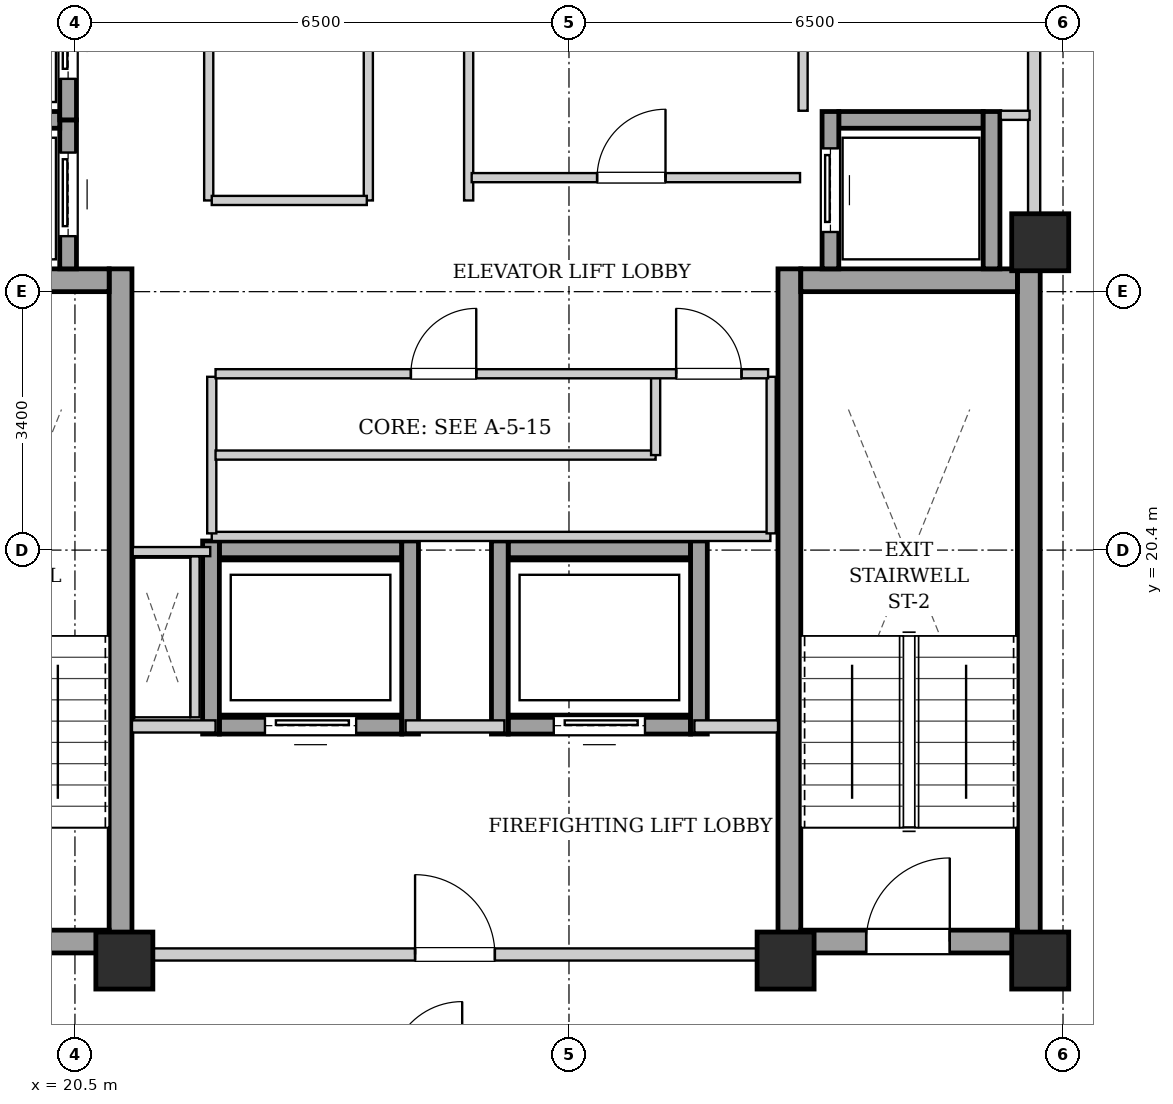
"""IFC4 building model, lengths in metres.
Left out: names, types, materials, properties, quantities, classifications, styles, units other than length and angle.
Written with IfcOpenShell. Run it as: python <this file> out.ifc"""

import sys

from ifc_helpers import new_model, si_unit, direction, frame, frame_2d, origin, origin_2d, place, context, subcontext, project, spatial, rectangle, extrude, element, fill, save


model = new_model("IFC4")
c1 = context("Model", 3, precision=1e-05, world=origin(), true_north=direction((0.0, 1.0)))
c2 = subcontext(c1, "Body", "Model", "MODEL_VIEW")
j1 = project(units=[si_unit("LENGTHUNIT", "METRE"), si_unit("PLANEANGLEUNIT", "RADIAN")], contexts=[c1])
p1 = place(None, origin())
s1 = spatial("IfcSite", under=j1, at=p1, CompositionType="ELEMENT")
p2 = place(p1, origin())
s2 = spatial("IfcBuilding", under=s1, at=p2, CompositionType="ELEMENT")
p3 = place(p2, frame((0.0, 0.0, 258.1)))
s3 = spatial("IfcBuildingStorey", under=s2, at=p3, CompositionType="ELEMENT", Elevation=258.1)
for number, where, z_axis, x_axis in (
    (1, (21.15, 15.0, 0.0), (0.0, 0.0, 1.0), (1.0, 0.0, 0.0)),
    (2, (29.85, 15.0, 0.0), (0.0, 0.0, 1.0), (1.0, 0.0, 0.0)),
    (3, (33.2, 15.0, 0.0), (0.0, 0.0, 1.0), (1.0, 0.0, 0.0)),
    (4, (33.2, 24.45, 0.0), (0.0, 0.0, 1.0), (1.0, 0.0, 0.0)),
):
    element("IfcColumn", number, at=place(p3, frame(where, z_axis=z_axis, x_axis=x_axis)), inside=s3, PredefinedType="COLUMN", context=c2, shape_type="SweptSolid", body=[
        extrude(rectangle(XDim=0.75, YDim=0.75, at=origin_2d()), origin(), (0.0, 0.0, 1.0), 3.4),
    ])
p4 = place(p3, frame((21.1, 15.1, 0.0), z_axis=(0.0, 0.0, 1.0), x_axis=(0.0, 1.0, 0.0)))
e5 = element("IfcWall", 5, at=p4, inside=s3, PredefinedType="SHEAR", context=c2, shape_type="SweptSolid", body=[
    extrude(rectangle(XDim=9.0, YDim=0.3, at=frame_2d((4.5, 0.0))), origin(), (0.0, 0.0, 1.0), 3.05),
])
p5 = place(p3, frame((18.1, 23.95, 0.0), z_axis=(0.0, 0.0, 1.0), x_axis=(1.0, 0.0, 0.0)))
e6 = element("IfcWall", 6, at=p5, inside=s3, PredefinedType="SHEAR", context=c2, shape_type="SweptSolid", body=[
    extrude(rectangle(XDim=2.85, YDim=0.3, at=frame_2d((1.425, 0.0))), origin(), (0.0, 0.0, 1.0), 3.05),
])
p6 = place(p3, frame((18.1, 15.25, 0.0), z_axis=(0.0, 0.0, 1.0), x_axis=(1.0, 0.0, 0.0)))
e7 = element("IfcWall", 7, at=p6, inside=s3, PredefinedType="SHEAR", context=c2, shape_type="SweptSolid", body=[
    extrude(rectangle(XDim=2.85, YDim=0.3, at=frame_2d((1.425, 0.0))), origin(), (0.0, 0.0, 1.0), 3.05),
])
p7 = place(p6, frame((0.86, 0.0, 0.0)))
e8 = element("IfcOpeningElement", 8, at=p7, cuts=e7, PredefinedType="OPENING", context=c2, shape_type="SweptSolid", body=[
    extrude(rectangle(XDim=1.1, YDim=2.05, at=frame_2d((0.55, 1.025))), frame((0.0, 0.16, 0.0), z_axis=(0.0, -1.0, 0.0), x_axis=(1.0, 0.0, 0.0)), (0.0, 0.0, 1.0), 0.32),
])
for number, where, z_axis, x_axis in (
    (9, (29.9, 15.1, 0.0), (0.0, 0.0, 1.0), (0.0, 1.0, 0.0)),
    (10, (33.05, 15.1, 0.0), (0.0, 0.0, 1.0), (0.0, 1.0, 0.0)),
):
    element("IfcWall", number, at=place(p3, frame(where, z_axis=z_axis, x_axis=x_axis)), inside=s3, PredefinedType="SHEAR", context=c2, shape_type="SweptSolid", body=[
        extrude(rectangle(XDim=9.0, YDim=0.3, at=frame_2d((4.5, 0.0))), origin(), (0.0, 0.0, 1.0), 3.05),
    ])
p8 = place(p3, frame((30.05, 23.95, 0.0), z_axis=(0.0, 0.0, 1.0), x_axis=(1.0, 0.0, 0.0)))
e11 = element("IfcWall", 11, at=p8, inside=s3, PredefinedType="SHEAR", context=c2, shape_type="SweptSolid", body=[
    extrude(rectangle(XDim=2.85, YDim=0.3, at=frame_2d((1.425, 0.0))), origin(), (0.0, 0.0, 1.0), 3.05),
])
p9 = place(p3, frame((30.05, 15.25, 0.0), z_axis=(0.0, 0.0, 1.0), x_axis=(1.0, 0.0, 0.0)))
e12 = element("IfcWall", 12, at=p9, inside=s3, PredefinedType="SHEAR", context=c2, shape_type="SweptSolid", body=[
    extrude(rectangle(XDim=2.85, YDim=0.3, at=frame_2d((1.425, 0.0))), origin(), (0.0, 0.0, 1.0), 3.05),
])
p10 = place(p9, frame((0.86, 0.0, 0.0)))
e13 = element("IfcOpeningElement", 13, at=p10, cuts=e12, PredefinedType="OPENING", context=c2, shape_type="SweptSolid", body=[
    extrude(rectangle(XDim=1.1, YDim=2.05, at=frame_2d((0.55, 1.025))), frame((0.0, 0.16, 0.0), z_axis=(0.0, -1.0, 0.0), x_axis=(1.0, 0.0, 0.0)), (0.0, 0.0, 1.0), 0.32),
])
p11 = place(p3, frame((20.41, 24.1, 0.0), z_axis=(0.0, 0.0, 1.0), x_axis=(0.0, 1.0, 0.0)))
e14 = element("IfcWall", 14, at=p11, inside=s3, PredefinedType="SHEAR", context=c2, shape_type="SweptSolid", body=[
    extrude(rectangle(XDim=1.96, YDim=0.22, at=frame_2d((0.98, 0.0))), origin(), (0.0, 0.0, 1.0), 3.05),
])
p12 = place(p11, frame((0.43, 0.0, 0.0)))
e15 = element("IfcOpeningElement", 15, at=p12, cuts=e14, PredefinedType="OPENING", context=c2, shape_type="SweptSolid", body=[
    extrude(rectangle(XDim=1.1, YDim=2.15, at=frame_2d((0.55, 1.075))), frame((0.0, 0.12, 0.0), z_axis=(0.0, -1.0, 0.0), x_axis=(1.0, 0.0, 0.0)), (0.0, 0.0, 1.0), 0.24),
])
p13 = place(p3, frame((18.4, 26.06, 0.0), z_axis=(0.0, 0.0, 1.0), x_axis=(1.0, 0.0, 0.0)))
e16 = element("IfcWall", 16, at=p13, inside=s3, PredefinedType="SHEAR", context=c2, shape_type="SweptSolid", body=[
    extrude(rectangle(XDim=1.9, YDim=0.22, at=frame_2d((0.95, 0.0))), origin(), (0.0, 0.0, 1.0), 3.05),
])
p14 = place(p3, frame((20.41, 26.06, 0.0), z_axis=(0.0, 0.0, 1.0), x_axis=(0.0, 1.0, 0.0)))
e17 = element("IfcWall", 17, at=p14, inside=s3, PredefinedType="SHEAR", context=c2, shape_type="SweptSolid", body=[
    extrude(rectangle(XDim=2.18, YDim=0.22, at=frame_2d((1.09, 0.0))), origin(), (0.0, 0.0, 1.0), 3.05),
])
p15 = place(p14, frame((0.54, 0.0, 0.0)))
e18 = element("IfcOpeningElement", 18, at=p15, cuts=e17, PredefinedType="OPENING", context=c2, shape_type="SweptSolid", body=[
    extrude(rectangle(XDim=1.1, YDim=2.15, at=frame_2d((0.55, 1.075))), frame((0.0, 0.12, 0.0), z_axis=(0.0, -1.0, 0.0), x_axis=(1.0, 0.0, 0.0)), (0.0, 0.0, 1.0), 0.24),
])
p16 = place(p3, frame((30.55, 26.06, 0.0), z_axis=(0.0, 0.0, 1.0), x_axis=(1.0, 0.0, 0.0)))
e19 = element("IfcWall", 19, at=p16, inside=s3, PredefinedType="SHEAR", context=c2, shape_type="SweptSolid", body=[
    extrude(rectangle(XDim=1.9, YDim=0.22, at=frame_2d((0.95, 0.0))), origin(), (0.0, 0.0, 1.0), 3.05),
])
p17 = place(p3, frame((30.44, 24.1, 0.0), z_axis=(0.0, 0.0, 1.0), x_axis=(0.0, 1.0, 0.0)))
e20 = element("IfcWall", 20, at=p17, inside=s3, PredefinedType="SHEAR", context=c2, shape_type="SweptSolid", body=[
    extrude(rectangle(XDim=2.07, YDim=0.22, at=frame_2d((1.035, 0.0))), origin(), (0.0, 0.0, 1.0), 3.05),
])
p18 = place(p17, frame((0.485, 0.0, 0.0)))
e21 = element("IfcOpeningElement", 21, at=p18, cuts=e20, PredefinedType="OPENING", context=c2, shape_type="SweptSolid", body=[
    extrude(rectangle(XDim=1.1, YDim=2.15, at=frame_2d((0.55, 1.075))), frame((0.0, 0.12, 0.0), z_axis=(0.0, -1.0, 0.0), x_axis=(1.0, 0.0, 0.0)), (0.0, 0.0, 1.0), 0.24),
])
p19 = place(p3, frame((32.56, 24.1, 0.0), z_axis=(0.0, 0.0, 1.0), x_axis=(0.0, 1.0, 0.0)))
e22 = element("IfcWall", 22, at=p19, inside=s3, PredefinedType="SHEAR", context=c2, shape_type="SweptSolid", body=[
    extrude(rectangle(XDim=2.07, YDim=0.22, at=frame_2d((1.035, 0.0))), origin(), (0.0, 0.0, 1.0), 3.05),
])
p20 = place(p3, frame((22.4, 18.09, 0.0), z_axis=(0.0, 0.0, 1.0), x_axis=(1.0, 0.0, 0.0)))
e23 = element("IfcWall", 23, at=p20, inside=s3, PredefinedType="SHEAR", context=c2, shape_type="SweptSolid", body=[
    extrude(rectangle(XDim=2.4, YDim=0.22, at=frame_2d((1.2, 0.0))), origin(), (0.0, 0.0, 1.0), 3.05),
])
p21 = place(p20, frame((0.6, 0.0, 0.0)))
e24 = element("IfcOpeningElement", 24, at=p21, cuts=e23, PredefinedType="OPENING", context=c2, shape_type="SweptSolid", body=[
    extrude(rectangle(XDim=1.2, YDim=2.15, at=frame_2d((0.6, 1.075))), frame((0.0, 0.12, 0.0), z_axis=(0.0, -1.0, 0.0), x_axis=(1.0, 0.0, 0.0)), (0.0, 0.0, 1.0), 0.24),
])
p22 = place(p3, frame((22.4, 20.41, 0.0), z_axis=(0.0, 0.0, 1.0), x_axis=(1.0, 0.0, 0.0)))
e25 = element("IfcWall", 25, at=p22, inside=s3, PredefinedType="SHEAR", context=c2, shape_type="SweptSolid", body=[
    extrude(rectangle(XDim=2.4, YDim=0.22, at=frame_2d((1.2, 0.0))), origin(), (0.0, 0.0, 1.0), 3.05),
])
for number, where, z_axis, x_axis in (
    (26, (22.29, 17.98, 0.0), (0.0, 0.0, 1.0), (0.0, 1.0, 0.0)),
    (27, (24.91, 17.98, 0.0), (0.0, 0.0, 1.0), (0.0, 1.0, 0.0)),
):
    element("IfcWall", number, at=place(p3, frame(where, z_axis=z_axis, x_axis=x_axis)), inside=s3, PredefinedType="SHEAR", context=c2, shape_type="SweptSolid", body=[
        extrude(rectangle(XDim=2.54, YDim=0.22, at=frame_2d((1.27, 0.0))), origin(), (0.0, 0.0, 1.0), 3.05),
    ])
p23 = place(p3, frame((26.2, 18.09, 0.0), z_axis=(0.0, 0.0, 1.0), x_axis=(1.0, 0.0, 0.0)))
e28 = element("IfcWall", 28, at=p23, inside=s3, PredefinedType="SHEAR", context=c2, shape_type="SweptSolid", body=[
    extrude(rectangle(XDim=2.4, YDim=0.22, at=frame_2d((1.2, 0.0))), origin(), (0.0, 0.0, 1.0), 3.05),
])
p24 = place(p23, frame((0.6, 0.0, 0.0)))
e29 = element("IfcOpeningElement", 29, at=p24, cuts=e28, PredefinedType="OPENING", context=c2, shape_type="SweptSolid", body=[
    extrude(rectangle(XDim=1.2, YDim=2.15, at=frame_2d((0.6, 1.075))), frame((0.0, 0.12, 0.0), z_axis=(0.0, -1.0, 0.0), x_axis=(1.0, 0.0, 0.0)), (0.0, 0.0, 1.0), 0.24),
])
p25 = place(p3, frame((26.2, 20.41, 0.0), z_axis=(0.0, 0.0, 1.0), x_axis=(1.0, 0.0, 0.0)))
e30 = element("IfcWall", 30, at=p25, inside=s3, PredefinedType="SHEAR", context=c2, shape_type="SweptSolid", body=[
    extrude(rectangle(XDim=2.4, YDim=0.22, at=frame_2d((1.2, 0.0))), origin(), (0.0, 0.0, 1.0), 3.05),
])
for number, where, z_axis, x_axis in (
    (31, (26.09, 17.98, 0.0), (0.0, 0.0, 1.0), (0.0, 1.0, 0.0)),
    (32, (28.71, 17.98, 0.0), (0.0, 0.0, 1.0), (0.0, 1.0, 0.0)),
):
    element("IfcWall", number, at=place(p3, frame(where, z_axis=z_axis, x_axis=x_axis)), inside=s3, PredefinedType="SHEAR", context=c2, shape_type="SweptSolid", body=[
        extrude(rectangle(XDim=2.54, YDim=0.22, at=frame_2d((1.27, 0.0))), origin(), (0.0, 0.0, 1.0), 3.05),
    ])
p26 = place(p3, frame((21.25, 15.08, 0.0), z_axis=(0.0, 0.0, 1.0), x_axis=(1.0, 0.0, 0.0)))
e33 = element("IfcWall", 33, at=p26, inside=s3, PredefinedType="PARTITIONING", context=c2, shape_type="SweptSolid", body=[
    extrude(rectangle(XDim=8.5, YDim=0.16, at=frame_2d((4.25, 0.0))), origin(), (0.0, 0.0, 1.0), 2.578),
])
p27 = place(p26, frame((3.725, 0.0, 0.0)))
e34 = element("IfcOpeningElement", 34, at=p27, cuts=e33, PredefinedType="OPENING", context=c2, shape_type="SweptSolid", body=[
    extrude(rectangle(XDim=1.05, YDim=2.05, at=frame_2d((0.525, 1.025))), frame((0.0, 0.09, 0.0), z_axis=(0.0, -1.0, 0.0), x_axis=(1.0, 0.0, 0.0)), (0.0, 0.0, 1.0), 0.18),
])
p28 = place(p3, frame((21.25, 18.08, 0.0), z_axis=(0.0, 0.0, 1.0), x_axis=(1.0, 0.0, 0.0)))
e35 = element("IfcWall", 35, at=p28, inside=s3, PredefinedType="PARTITIONING", context=c2, shape_type="SweptSolid", body=[
    extrude(rectangle(XDim=1.1, YDim=0.16, at=frame_2d((0.55, 0.0))), origin(), (0.0, 0.0, 1.0), 3.05),
])
p29 = place(p3, frame((24.85, 18.08, 0.0), z_axis=(0.0, 0.0, 1.0), x_axis=(1.0, 0.0, 0.0)))
e36 = element("IfcWall", 36, at=p29, inside=s3, PredefinedType="PARTITIONING", context=c2, shape_type="SweptSolid", body=[
    extrude(rectangle(XDim=1.3, YDim=0.16, at=frame_2d((0.65, 0.0))), origin(), (0.0, 0.0, 1.0), 3.05),
])
p30 = place(p3, frame((28.65, 18.08, 0.0), z_axis=(0.0, 0.0, 1.0), x_axis=(1.0, 0.0, 0.0)))
e37 = element("IfcWall", 37, at=p30, inside=s3, PredefinedType="PARTITIONING", context=c2, shape_type="SweptSolid", body=[
    extrude(rectangle(XDim=1.1, YDim=0.16, at=frame_2d((0.55, 0.0))), origin(), (0.0, 0.0, 1.0), 3.05),
])
p31 = place(p3, frame((33.12, 24.12, 0.0), z_axis=(0.0, 0.0, 1.0), x_axis=(0.0, 1.0, 0.0)))
e38 = element("IfcWall", 38, at=p31, inside=s3, PredefinedType="PARTITIONING", context=c2, shape_type="SweptSolid", body=[
    extrude(rectangle(XDim=4.76, YDim=0.16, at=frame_2d((2.38, 0.0))), origin(), (0.0, 0.0, 1.0), 2.385),
])
p32 = place(p3, frame((22.08, 18.2, 0.0), z_axis=(0.0, 0.0, 1.0), x_axis=(0.0, 1.0, 0.0)))
e39 = element("IfcWall", 39, at=p32, inside=s3, PredefinedType="PARTITIONING", context=c2, shape_type="SweptSolid", body=[
    extrude(rectangle(XDim=2.12, YDim=0.12, at=frame_2d((1.06, 0.0))), origin(), (0.0, 0.0, 1.0), 3.05),
])
p33 = place(p3, frame((22.28, 20.38, 0.0), z_axis=(0.0, 0.0, 1.0), x_axis=(-1.0, 0.0, 0.0)))
e40 = element("IfcWall", 40, at=p33, inside=s3, PredefinedType="PARTITIONING", context=c2, shape_type="SweptSolid", body=[
    extrude(rectangle(XDim=1.02, YDim=0.12, at=frame_2d((0.51, 0.0))), origin(), (0.0, 0.0, 1.0), 3.05),
])
for number, where, z_axis, x_axis in (
    (41, (24.36, 25.0, 0.0), (0.0, 0.0, 1.0), (0.0, 1.0, 0.0)),
    (42, (25.68, 25.0, 0.0), (0.0, 0.0, 1.0), (0.0, 1.0, 0.0)),
):
    element("IfcWall", number, at=place(p3, frame(where, z_axis=z_axis, x_axis=x_axis)), inside=s3, PredefinedType="PARTITIONING", context=c2, shape_type="SweptSolid", body=[
        extrude(rectangle(XDim=3.87, YDim=0.12, at=frame_2d((1.935, 0.0))), origin(), (0.0, 0.0, 1.0), 3.05),
    ])
p34 = place(p3, frame((30.08, 26.18, 0.0), z_axis=(0.0, 0.0, 1.0), x_axis=(0.0, 1.0, 0.0)))
e43 = element("IfcWall", 43, at=p34, inside=s3, PredefinedType="PARTITIONING", context=c2, shape_type="SweptSolid", body=[
    extrude(rectangle(XDim=1.28, YDim=0.12, at=frame_2d((0.64, 0.0))), origin(), (0.0, 0.0, 1.0), 3.05),
])
p35 = place(p3, frame((32.68, 26.12, 0.0), z_axis=(0.0, 0.0, 1.0), x_axis=(1.0, 0.0, 0.0)))
e44 = element("IfcWall", 44, at=p35, inside=s3, PredefinedType="PARTITIONING", context=c2, shape_type="SweptSolid", body=[
    extrude(rectangle(XDim=0.38, YDim=0.12, at=frame_2d((0.19, 0.0))), origin(), (0.0, 0.0, 1.0), 3.05),
])
p36 = place(p3, frame((22.26, 25.0, 0.0), z_axis=(0.0, 0.0, 1.0), x_axis=(0.0, 1.0, 0.0)))
e45 = element("IfcWall", 45, at=p36, inside=s3, PredefinedType="PARTITIONING", context=c2, shape_type="SweptSolid", body=[
    extrude(rectangle(XDim=3.86, YDim=0.12, at=frame_2d((1.93, 0.0))), origin(), (0.0, 0.0, 1.0), 3.05),
])
p37 = place(p3, frame((22.3, 25.0, 0.0), z_axis=(0.0, 0.0, 1.0), x_axis=(1.0, 0.0, 0.0)))
e46 = element("IfcWall", 46, at=p37, inside=s3, PredefinedType="PARTITIONING", context=c2, shape_type="SweptSolid", body=[
    extrude(rectangle(XDim=2.04, YDim=0.12, at=frame_2d((1.02, 0.0))), origin(), (0.0, 0.0, 1.0), 3.05),
])
p38 = place(p3, frame((25.72, 25.3, 0.0), z_axis=(0.0, 0.0, 1.0), x_axis=(1.0, 0.0, 0.0)))
e47 = element("IfcWall", 47, at=p38, inside=s3, PredefinedType="PARTITIONING", context=c2, shape_type="SweptSolid", body=[
    extrude(rectangle(XDim=4.32, YDim=0.12, at=frame_2d((2.16, 0.0))), origin(), (0.0, 0.0, 1.0), 3.05),
])
p39 = place(p38, frame((1.65, 0.0, 0.0)))
e48 = element("IfcOpeningElement", 48, at=p39, cuts=e47, PredefinedType="OPENING", context=c2, shape_type="SweptSolid", body=[
    extrude(rectangle(XDim=0.9, YDim=2.05, at=frame_2d((0.45, 1.025))), frame((0.0, 0.07, 0.0), z_axis=(0.0, -1.0, 0.0), x_axis=(1.0, 0.0, 0.0)), (0.0, 0.0, 1.0), 0.14),
])
p40 = place(p3, frame((22.3, 20.58, 0.0), z_axis=(0.0, 0.0, 1.0), x_axis=(1.0, 0.0, 0.0)))
e49 = element("IfcWall", 49, at=p40, inside=s3, PredefinedType="PARTITIONING", context=c2, shape_type="SweptSolid", body=[
    extrude(rectangle(XDim=7.35, YDim=0.12, at=frame_2d((3.675, 0.0))), origin(), (0.0, 0.0, 1.0), 3.05),
])
for number, where, z_axis, x_axis in (
    (50, (22.3, 20.62, 0.0), (0.0, 0.0, 1.0), (0.0, 1.0, 0.0)),
    (51, (29.66, 20.62, 0.0), (0.0, 0.0, 1.0), (0.0, 1.0, 0.0)),
):
    element("IfcWall", number, at=place(p3, frame(where, z_axis=z_axis, x_axis=x_axis)), inside=s3, PredefinedType="PARTITIONING", context=c2, shape_type="SweptSolid", body=[
        extrude(rectangle(XDim=2.06, YDim=0.12, at=frame_2d((1.03, 0.0))), origin(), (0.0, 0.0, 1.0), 3.05),
    ])
p41 = place(p3, frame((22.35, 21.65, 0.0), z_axis=(0.0, 0.0, 1.0), x_axis=(1.0, 0.0, 0.0)))
e52 = element("IfcWall", 52, at=p41, inside=s3, PredefinedType="PARTITIONING", context=c2, shape_type="SweptSolid", body=[
    extrude(rectangle(XDim=5.79, YDim=0.12, at=frame_2d((2.895, 0.0))), origin(), (0.0, 0.0, 1.0), 3.05),
])
p42 = place(p3, frame((28.14, 21.65, 0.0), z_axis=(0.0, 0.0, 1.0), x_axis=(0.0, 1.0, 0.0)))
e53 = element("IfcWall", 53, at=p42, inside=s3, PredefinedType="PARTITIONING", context=c2, shape_type="SweptSolid", body=[
    extrude(rectangle(XDim=1.03, YDim=0.12, at=frame_2d((0.515, 0.0))), origin(), (0.0, 0.0, 1.0), 3.05),
])
p43 = place(p3, frame((22.35, 22.72, 0.0), z_axis=(0.0, 0.0, 1.0), x_axis=(1.0, 0.0, 0.0)))
e54 = element("IfcWall", 54, at=p43, inside=s3, PredefinedType="PARTITIONING", context=c2, shape_type="SweptSolid", body=[
    extrude(rectangle(XDim=7.27, YDim=0.12, at=frame_2d((3.635, 0.0))), origin(), (0.0, 0.0, 1.0), 3.05),
])
p44 = place(p43, frame((2.57, 0.0, 0.0)))
e55 = element("IfcOpeningElement", 55, at=p44, cuts=e54, PredefinedType="OPENING", context=c2, shape_type="SweptSolid", body=[
    extrude(rectangle(XDim=0.86, YDim=2.05, at=frame_2d((0.43, 1.025))), frame((0.0, 0.07, 0.0), z_axis=(0.0, -1.0, 0.0), x_axis=(1.0, 0.0, 0.0)), (0.0, 0.0, 1.0), 0.14),
])
p45 = place(p43, frame((6.06, 0.0, 0.0)))
e56 = element("IfcOpeningElement", 56, at=p45, cuts=e54, PredefinedType="OPENING", context=c2, shape_type="SweptSolid", body=[
    extrude(rectangle(XDim=0.86, YDim=2.05, at=frame_2d((0.43, 1.025))), frame((0.0, 0.07, 0.0), z_axis=(0.0, -1.0, 0.0), x_axis=(1.0, 0.0, 0.0)), (0.0, 0.0, 1.0), 0.14),
])
p46 = place(p10, origin())
e57 = element("IfcDoor", 57, at=p46, inside=s3, OperationType="SINGLE_SWING_RIGHT", PredefinedType="DOOR", context=c2, shape_type="SweptSolid", body=[
    extrude(rectangle(XDim=1.1, YDim=2.05, at=frame_2d((0.55, 1.025))), frame((0.0, 0.025, 0.0), z_axis=(0.0, -1.0, 0.0), x_axis=(1.0, 0.0, 0.0)), (0.0, 0.0, 1.0), 0.05),
])
fill(e13, e57)
p47 = place(p12, origin())
e58 = element("IfcDoor", 58, at=p47, inside=s3, OperationType="SLIDING_TO_LEFT", PredefinedType="DOOR", context=c2, shape_type="SweptSolid", body=[
    extrude(rectangle(XDim=1.1, YDim=2.15, at=frame_2d((0.55, 1.075))), frame((0.0, 0.025, 0.0), z_axis=(0.0, -1.0, 0.0), x_axis=(1.0, 0.0, 0.0)), (0.0, 0.0, 1.0), 0.05),
])
fill(e15, e58)
p48 = place(p15, origin())
e59 = element("IfcDoor", 59, at=p48, inside=s3, OperationType="SLIDING_TO_LEFT", PredefinedType="DOOR", context=c2, shape_type="SweptSolid", body=[
    extrude(rectangle(XDim=1.1, YDim=2.15, at=frame_2d((0.55, 1.075))), frame((0.0, 0.025, 0.0), z_axis=(0.0, -1.0, 0.0), x_axis=(1.0, 0.0, 0.0)), (0.0, 0.0, 1.0), 0.05),
])
fill(e18, e59)
p49 = place(p18, origin())
e60 = element("IfcDoor", 60, at=p49, inside=s3, OperationType="SLIDING_TO_LEFT", PredefinedType="DOOR", context=c2, shape_type="SweptSolid", body=[
    extrude(rectangle(XDim=1.1, YDim=2.15, at=frame_2d((0.55, 1.075))), frame((0.0, 0.025, 0.0), z_axis=(0.0, -1.0, 0.0), x_axis=(1.0, 0.0, 0.0)), (0.0, 0.0, 1.0), 0.05),
])
fill(e21, e60)
p50 = place(p21, origin())
e61 = element("IfcDoor", 61, at=p50, inside=s3, OperationType="SLIDING_TO_LEFT", PredefinedType="DOOR", context=c2, shape_type="SweptSolid", body=[
    extrude(rectangle(XDim=1.2, YDim=2.15, at=frame_2d((0.6, 1.075))), frame((0.0, 0.025, 0.0), z_axis=(0.0, -1.0, 0.0), x_axis=(1.0, 0.0, 0.0)), (0.0, 0.0, 1.0), 0.05),
])
fill(e24, e61)
p51 = place(p24, origin())
e62 = element("IfcDoor", 62, at=p51, inside=s3, OperationType="SLIDING_TO_LEFT", PredefinedType="DOOR", context=c2, shape_type="SweptSolid", body=[
    extrude(rectangle(XDim=1.2, YDim=2.15, at=frame_2d((0.6, 1.075))), frame((0.0, 0.025, 0.0), z_axis=(0.0, -1.0, 0.0), x_axis=(1.0, 0.0, 0.0)), (0.0, 0.0, 1.0), 0.05),
])
fill(e29, e62)
p52 = place(p27, origin())
e63 = element("IfcDoor", 63, at=p52, inside=s3, OperationType="SINGLE_SWING_LEFT", PredefinedType="DOOR", context=c2, shape_type="SweptSolid", body=[
    extrude(rectangle(XDim=1.05, YDim=2.05, at=frame_2d((0.525, 1.025))), frame((0.0, 0.025, 0.0), z_axis=(0.0, -1.0, 0.0), x_axis=(1.0, 0.0, 0.0)), (0.0, 0.0, 1.0), 0.05),
])
fill(e34, e63)
p53 = place(p39, origin())
e64 = element("IfcDoor", 64, at=p53, inside=s3, OperationType="SINGLE_SWING_RIGHT", PredefinedType="DOOR", context=c2, shape_type="SweptSolid", body=[
    extrude(rectangle(XDim=0.9, YDim=2.05, at=frame_2d((0.45, 1.025))), frame((0.0, 0.025, 0.0), z_axis=(0.0, -1.0, 0.0), x_axis=(1.0, 0.0, 0.0)), (0.0, 0.0, 1.0), 0.05),
])
fill(e48, e64)
p54 = place(p44, origin())
e65 = element("IfcDoor", 65, at=p54, inside=s3, OperationType="SINGLE_SWING_RIGHT", PredefinedType="DOOR", context=c2, shape_type="SweptSolid", body=[
    extrude(rectangle(XDim=0.86, YDim=2.05, at=frame_2d((0.43, 1.025))), frame((0.0, 0.025, 0.0), z_axis=(0.0, -1.0, 0.0), x_axis=(1.0, 0.0, 0.0)), (0.0, 0.0, 1.0), 0.05),
])
fill(e55, e65)
p55 = place(p45, origin())
e66 = element("IfcDoor", 66, at=p55, inside=s3, OperationType="SINGLE_SWING_LEFT", PredefinedType="DOOR", context=c2, shape_type="SweptSolid", body=[
    extrude(rectangle(XDim=0.86, YDim=2.05, at=frame_2d((0.43, 1.025))), frame((0.0, 0.025, 0.0), z_axis=(0.0, -1.0, 0.0), x_axis=(1.0, 0.0, 0.0)), (0.0, 0.0, 1.0), 0.05),
])
fill(e56, e66)
save(model, sys.argv[1])
